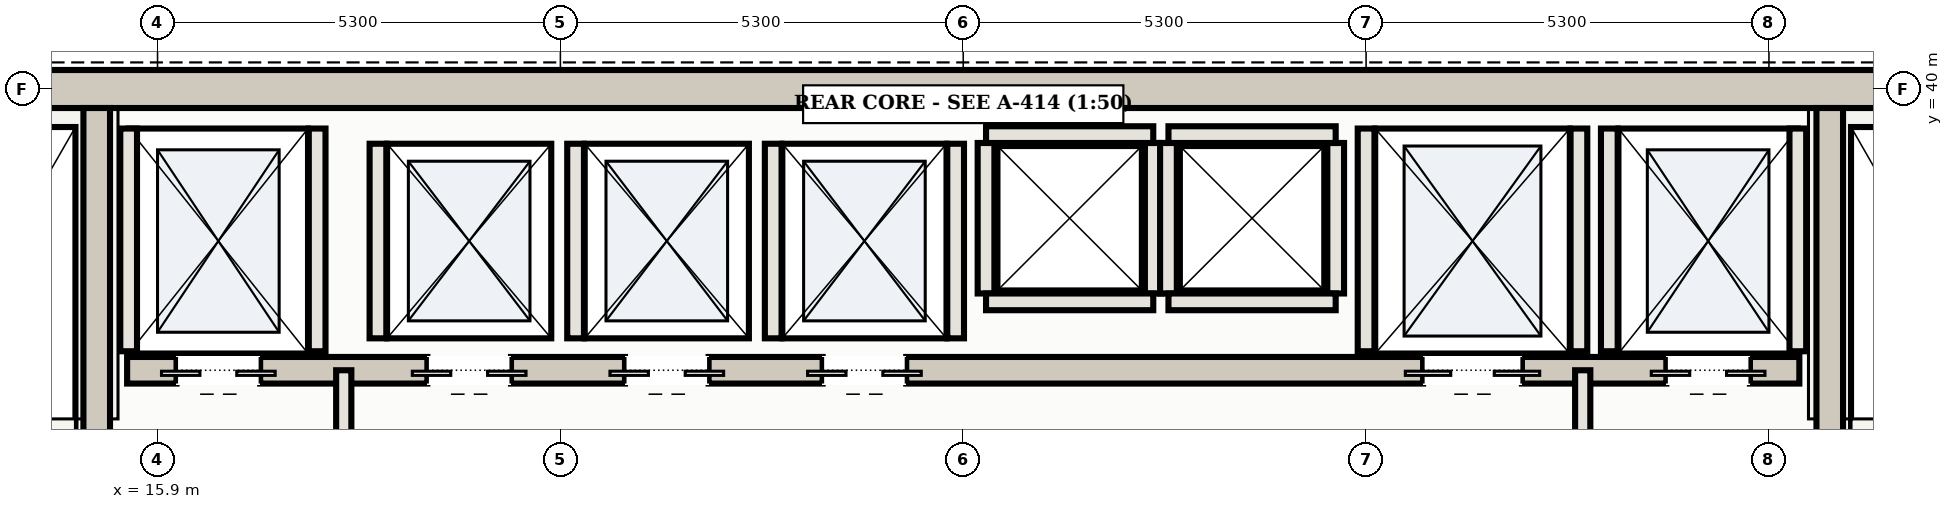
"""IFC4 building model, lengths in metres.
Left out: names, types, materials, properties, quantities, classifications, styles, units other than length and angle.
Written with IfcOpenShell. Run it as: python <this file> out.ifc"""

import sys

from ifc_helpers import new_model, si_unit, direction, frame, frame_2d, origin, place, context, subcontext, project, spatial, rectangle, extrude, element, fill, save


model = new_model("IFC4")
c1 = context("Model", 3, precision=1e-05, world=origin(), true_north=direction((0.0, 1.0)))
c2 = subcontext(c1, "Body", "Model", "MODEL_VIEW")
j1 = project(units=[si_unit("LENGTHUNIT", "METRE"), si_unit("PLANEANGLEUNIT", "RADIAN")], contexts=[c1])
p1 = place(None, origin())
s1 = spatial("IfcSite", under=j1, at=p1, CompositionType="ELEMENT")
p2 = place(p1, origin())
s2 = spatial("IfcBuilding", under=s1, at=p2, CompositionType="ELEMENT")
p3 = place(p2, frame((0.0, 0.0, 249.5)))
s3 = spatial("IfcBuildingStorey", under=s2, at=p3, CompositionType="ELEMENT", Elevation=249.5)
p4 = place(p3, frame((10.35, 40.0, 0.0), z_axis=(0.0, 0.0, 1.0), x_axis=(1.0, 0.0, 0.0)))
e1 = element("IfcWall", 1, at=p4, inside=s3, PredefinedType="SHEAR", context=c2, shape_type="SweptSolid", body=[
    extrude(rectangle(XDim=32.3, YDim=0.5, at=frame_2d((16.15, 0.0))), origin(), (0.0, 0.0, 1.0), 3.11),
])
p5 = place(p3, frame((15.1, 31.1, 0.0), z_axis=(0.0, 0.0, 1.0), x_axis=(0.0, 1.0, 0.0)))
e2 = element("IfcWall", 2, at=p5, inside=s3, PredefinedType="SHEAR", context=c2, shape_type="SweptSolid", body=[
    extrude(rectangle(XDim=8.65, YDim=0.35, at=frame_2d((4.325, 0.0))), origin(), (0.0, 0.0, 1.0), 3.11),
])
p6 = place(p5, frame((0.51, 0.0, 0.0)))
e3 = element("IfcOpeningElement", 3, at=p6, cuts=e2, PredefinedType="OPENING", context=c2, shape_type="SweptSolid", body=[
    extrude(rectangle(XDim=1.15, YDim=2.2, at=frame_2d((0.575, 1.1))), frame((0.0, 0.185, 0.0), z_axis=(0.0, -1.0, 0.0), x_axis=(1.0, 0.0, 0.0)), (0.0, 0.0, 1.0), 0.37),
])
p7 = place(p3, frame((37.9, 31.1, 0.0), z_axis=(0.0, 0.0, 1.0), x_axis=(0.0, 1.0, 0.0)))
e4 = element("IfcWall", 4, at=p7, inside=s3, PredefinedType="SHEAR", context=c2, shape_type="SweptSolid", body=[
    extrude(rectangle(XDim=8.65, YDim=0.35, at=frame_2d((4.325, 0.0))), origin(), (0.0, 0.0, 1.0), 3.11),
])
p8 = place(p7, frame((0.51, 0.0, 0.0)))
e5 = element("IfcOpeningElement", 5, at=p8, cuts=e4, PredefinedType="OPENING", context=c2, shape_type="SweptSolid", body=[
    extrude(rectangle(XDim=1.15, YDim=2.2, at=frame_2d((0.575, 1.1))), frame((0.0, 0.185, 0.0), z_axis=(0.0, -1.0, 0.0), x_axis=(1.0, 0.0, 0.0)), (0.0, 0.0, 1.0), 0.37),
])
p9 = place(p3, frame((15.5, 36.3, 0.0), z_axis=(0.0, 0.0, 1.0), x_axis=(1.0, 0.0, 0.0)))
e6 = element("IfcWall", 6, at=p9, inside=s3, PredefinedType="SHEAR", context=c2, shape_type="SweptSolid", body=[
    extrude(rectangle(XDim=22.0, YDim=0.35, at=frame_2d((11.0, 0.0))), origin(), (0.0, 0.0, 1.0), 3.11),
])
p10 = place(p9, frame((0.65, 0.0, 0.0)))
e7 = element("IfcOpeningElement", 7, at=p10, cuts=e6, PredefinedType="OPENING", context=c2, shape_type="SweptSolid", body=[
    extrude(rectangle(XDim=1.1, YDim=2.15, at=frame_2d((0.55, 1.075))), frame((0.0, 0.185, 0.0), z_axis=(0.0, -1.0, 0.0), x_axis=(1.0, 0.0, 0.0)), (0.0, 0.0, 1.0), 0.37),
])
p11 = place(p9, frame((20.25, 0.0, 0.0)))
e8 = element("IfcOpeningElement", 8, at=p11, cuts=e6, PredefinedType="OPENING", context=c2, shape_type="SweptSolid", body=[
    extrude(rectangle(XDim=1.1, YDim=2.15, at=frame_2d((0.55, 1.075))), frame((0.0, 0.185, 0.0), z_axis=(0.0, -1.0, 0.0), x_axis=(1.0, 0.0, 0.0)), (0.0, 0.0, 1.0), 0.37),
])
p12 = place(p9, frame((17.05, 0.0, 0.0)))
e9 = element("IfcOpeningElement", 9, at=p12, cuts=e6, PredefinedType="OPENING", context=c2, shape_type="SweptSolid", body=[
    extrude(rectangle(XDim=1.3, YDim=2.2, at=frame_2d((0.65, 1.1))), frame((0.0, 0.185, 0.0), z_axis=(0.0, -1.0, 0.0), x_axis=(1.0, 0.0, 0.0)), (0.0, 0.0, 1.0), 0.37),
])
p13 = place(p9, frame((3.95, 0.0, 0.0)))
e10 = element("IfcOpeningElement", 10, at=p13, cuts=e6, PredefinedType="OPENING", context=c2, shape_type="SweptSolid", body=[
    extrude(rectangle(XDim=1.1, YDim=2.15, at=frame_2d((0.55, 1.075))), frame((0.0, 0.185, 0.0), z_axis=(0.0, -1.0, 0.0), x_axis=(1.0, 0.0, 0.0)), (0.0, 0.0, 1.0), 0.37),
])
p14 = place(p9, frame((6.55, 0.0, 0.0)))
e11 = element("IfcOpeningElement", 11, at=p14, cuts=e6, PredefinedType="OPENING", context=c2, shape_type="SweptSolid", body=[
    extrude(rectangle(XDim=1.1, YDim=2.15, at=frame_2d((0.55, 1.075))), frame((0.0, 0.185, 0.0), z_axis=(0.0, -1.0, 0.0), x_axis=(1.0, 0.0, 0.0)), (0.0, 0.0, 1.0), 0.37),
])
p15 = place(p9, frame((9.15, 0.0, 0.0)))
e12 = element("IfcOpeningElement", 12, at=p15, cuts=e6, PredefinedType="OPENING", context=c2, shape_type="SweptSolid", body=[
    extrude(rectangle(XDim=1.1, YDim=2.15, at=frame_2d((0.55, 1.075))), frame((0.0, 0.185, 0.0), z_axis=(0.0, -1.0, 0.0), x_axis=(1.0, 0.0, 0.0)), (0.0, 0.0, 1.0), 0.37),
])
for number, where, z_axis, x_axis in (
    (13, (15.52, 36.55, 0.0), (0.0, 0.0, 1.0), (0.0, 1.0, 0.0)),
    (14, (18.0, 36.55, 0.0), (0.0, 0.0, 1.0), (0.0, 1.0, 0.0)),
    (15, (35.0, 36.55, 0.0), (0.0, 0.0, 1.0), (0.0, 1.0, 0.0)),
    (16, (37.48, 36.55, 0.0), (0.0, 0.0, 1.0), (0.0, 1.0, 0.0)),
    (17, (31.8, 36.55, 0.0), (0.0, 0.0, 1.0), (0.0, 1.0, 0.0)),
    (18, (34.6, 36.55, 0.0), (0.0, 0.0, 1.0), (0.0, 1.0, 0.0)),
):
    element("IfcWall", number, at=place(p3, frame(where, z_axis=z_axis, x_axis=x_axis)), inside=s3, PredefinedType="SOLIDWALL", context=c2, shape_type="SweptSolid", body=[
        extrude(rectangle(XDim=2.93, YDim=0.22, at=frame_2d((1.465, 0.0))), origin(), (0.0, 0.0, 1.0), 3.11),
    ])
for number, where, z_axis, x_axis in (
    (19, (18.8, 36.72, 0.0), (0.0, 0.0, 1.0), (0.0, 1.0, 0.0)),
    (20, (21.4, 36.72, 0.0), (0.0, 0.0, 1.0), (0.0, 1.0, 0.0)),
    (21, (24.0, 36.72, 0.0), (0.0, 0.0, 1.0), (0.0, 1.0, 0.0)),
    (22, (26.4, 36.72, 0.0), (0.0, 0.0, 1.0), (0.0, 1.0, 0.0)),
):
    element("IfcWall", number, at=place(p3, frame(where, z_axis=z_axis, x_axis=x_axis)), inside=s3, PredefinedType="SOLIDWALL", context=c2, shape_type="SweptSolid", body=[
        extrude(rectangle(XDim=2.56, YDim=0.22, at=frame_2d((1.28, 0.0))), origin(), (0.0, 0.0, 1.0), 3.11),
    ])
for number, where, z_axis, x_axis in (
    (23, (26.8, 37.31, 0.0), (0.0, 0.0, 1.0), (0.0, 1.0, 0.0)),
    (24, (29.0, 37.31, 0.0), (0.0, 0.0, 1.0), (0.0, 1.0, 0.0)),
):
    element("IfcWall", number, at=place(p3, frame(where, z_axis=z_axis, x_axis=x_axis)), inside=s3, PredefinedType="SOLIDWALL", context=c2, shape_type="SweptSolid", body=[
        extrude(rectangle(XDim=1.98, YDim=0.22, at=frame_2d((0.99, 0.0))), origin(), (0.0, 0.0, 1.0), 3.11),
    ])
for number, where, z_axis, x_axis in (
    (25, (26.8, 39.4, 0.0), (0.0, 0.0, 1.0), (1.0, 0.0, 0.0)),
    (26, (26.8, 37.2, 0.0), (0.0, 0.0, 1.0), (1.0, 0.0, 0.0)),
):
    element("IfcWall", number, at=place(p3, frame(where, z_axis=z_axis, x_axis=x_axis)), inside=s3, PredefinedType="SOLIDWALL", context=c2, shape_type="SweptSolid", body=[
        extrude(rectangle(XDim=2.2, YDim=0.22, at=frame_2d((1.1, 0.0))), origin(), (0.0, 0.0, 1.0), 3.11),
    ])
for number, where, z_axis, x_axis in (
    (27, (29.2, 37.31, 0.0), (0.0, 0.0, 1.0), (0.0, 1.0, 0.0)),
    (28, (31.4, 37.31, 0.0), (0.0, 0.0, 1.0), (0.0, 1.0, 0.0)),
):
    element("IfcWall", number, at=place(p3, frame(where, z_axis=z_axis, x_axis=x_axis)), inside=s3, PredefinedType="SOLIDWALL", context=c2, shape_type="SweptSolid", body=[
        extrude(rectangle(XDim=1.98, YDim=0.22, at=frame_2d((0.99, 0.0))), origin(), (0.0, 0.0, 1.0), 3.11),
    ])
for number, where, z_axis, x_axis in (
    (29, (29.2, 39.4, 0.0), (0.0, 0.0, 1.0), (1.0, 0.0, 0.0)),
    (30, (29.2, 37.2, 0.0), (0.0, 0.0, 1.0), (1.0, 0.0, 0.0)),
):
    element("IfcWall", number, at=place(p3, frame(where, z_axis=z_axis, x_axis=x_axis)), inside=s3, PredefinedType="SOLIDWALL", context=c2, shape_type="SweptSolid", body=[
        extrude(rectangle(XDim=2.2, YDim=0.22, at=frame_2d((1.1, 0.0))), origin(), (0.0, 0.0, 1.0), 3.11),
    ])
p16 = place(p3, frame((18.35, 31.15, 0.0), z_axis=(0.0, 0.0, 1.0), x_axis=(0.0, 1.0, 0.0)))
e31 = element("IfcWall", 31, at=p16, inside=s3, PredefinedType="PARTITIONING", context=c2, shape_type="SweptSolid", body=[
    extrude(rectangle(XDim=5.15, YDim=0.2, at=frame_2d((2.575, 0.0))), origin(), (0.0, 0.0, 1.0), 2.45),
])
p17 = place(p16, frame((1.875, 0.0, 0.0)))
e32 = element("IfcOpeningElement", 32, at=p17, cuts=e31, PredefinedType="OPENING", context=c2, shape_type="SweptSolid", body=[
    extrude(rectangle(XDim=1.25, YDim=2.2, at=frame_2d((0.625, 1.1))), frame((0.0, 0.11, 0.0), z_axis=(0.0, -1.0, 0.0), x_axis=(1.0, 0.0, 0.0)), (0.0, 0.0, 1.0), 0.22),
])
p18 = place(p3, frame((34.65, 31.15, 0.0), z_axis=(0.0, 0.0, 1.0), x_axis=(0.0, 1.0, 0.0)))
e33 = element("IfcWall", 33, at=p18, inside=s3, PredefinedType="PARTITIONING", context=c2, shape_type="SweptSolid", body=[
    extrude(rectangle(XDim=5.15, YDim=0.2, at=frame_2d((2.575, 0.0))), origin(), (0.0, 0.0, 1.0), 2.45),
])
p19 = place(p18, frame((1.875, 0.0, 0.0)))
e34 = element("IfcOpeningElement", 34, at=p19, cuts=e33, PredefinedType="OPENING", context=c2, shape_type="SweptSolid", body=[
    extrude(rectangle(XDim=1.25, YDim=2.2, at=frame_2d((0.625, 1.1))), frame((0.0, 0.11, 0.0), z_axis=(0.0, -1.0, 0.0), x_axis=(1.0, 0.0, 0.0)), (0.0, 0.0, 1.0), 0.22),
])
p20 = place(p10, frame((1.1, 0.0, 0.0), z_axis=(0.0, 0.0, 1.0), x_axis=(-1.0, 0.0, 0.0)))
e35 = element("IfcDoor", 35, at=p20, inside=s3, OperationType="DOUBLE_DOOR_SLIDING", PredefinedType="DOOR", context=c2, shape_type="SweptSolid", body=[
    extrude(rectangle(XDim=1.1, YDim=2.15, at=frame_2d((0.55, 1.075))), frame((0.0, 0.025, 0.0), z_axis=(0.0, -1.0, 0.0), x_axis=(1.0, 0.0, 0.0)), (0.0, 0.0, 1.0), 0.05),
])
fill(e7, e35)
p21 = place(p11, frame((1.1, 0.0, 0.0), z_axis=(0.0, 0.0, 1.0), x_axis=(-1.0, 0.0, 0.0)))
e36 = element("IfcDoor", 36, at=p21, inside=s3, OperationType="DOUBLE_DOOR_SLIDING", PredefinedType="DOOR", context=c2, shape_type="SweptSolid", body=[
    extrude(rectangle(XDim=1.1, YDim=2.15, at=frame_2d((0.55, 1.075))), frame((0.0, 0.025, 0.0), z_axis=(0.0, -1.0, 0.0), x_axis=(1.0, 0.0, 0.0)), (0.0, 0.0, 1.0), 0.05),
])
fill(e8, e36)
p22 = place(p12, frame((1.3, 0.0, 0.0), z_axis=(0.0, 0.0, 1.0), x_axis=(-1.0, 0.0, 0.0)))
e37 = element("IfcDoor", 37, at=p22, inside=s3, OperationType="DOUBLE_DOOR_SLIDING", PredefinedType="DOOR", context=c2, shape_type="SweptSolid", body=[
    extrude(rectangle(XDim=1.3, YDim=2.2, at=frame_2d((0.65, 1.1))), frame((0.0, 0.025, 0.0), z_axis=(0.0, -1.0, 0.0), x_axis=(1.0, 0.0, 0.0)), (0.0, 0.0, 1.0), 0.05),
])
fill(e9, e37)
p23 = place(p13, frame((1.1, 0.0, 0.0), z_axis=(0.0, 0.0, 1.0), x_axis=(-1.0, 0.0, 0.0)))
e38 = element("IfcDoor", 38, at=p23, inside=s3, OperationType="DOUBLE_DOOR_SLIDING", PredefinedType="DOOR", context=c2, shape_type="SweptSolid", body=[
    extrude(rectangle(XDim=1.1, YDim=2.15, at=frame_2d((0.55, 1.075))), frame((0.0, 0.025, 0.0), z_axis=(0.0, -1.0, 0.0), x_axis=(1.0, 0.0, 0.0)), (0.0, 0.0, 1.0), 0.05),
])
fill(e10, e38)
p24 = place(p14, frame((1.1, 0.0, 0.0), z_axis=(0.0, 0.0, 1.0), x_axis=(-1.0, 0.0, 0.0)))
e39 = element("IfcDoor", 39, at=p24, inside=s3, OperationType="DOUBLE_DOOR_SLIDING", PredefinedType="DOOR", context=c2, shape_type="SweptSolid", body=[
    extrude(rectangle(XDim=1.1, YDim=2.15, at=frame_2d((0.55, 1.075))), frame((0.0, 0.025, 0.0), z_axis=(0.0, -1.0, 0.0), x_axis=(1.0, 0.0, 0.0)), (0.0, 0.0, 1.0), 0.05),
])
fill(e11, e39)
p25 = place(p15, frame((1.1, 0.0, 0.0), z_axis=(0.0, 0.0, 1.0), x_axis=(-1.0, 0.0, 0.0)))
e40 = element("IfcDoor", 40, at=p25, inside=s3, OperationType="DOUBLE_DOOR_SLIDING", PredefinedType="DOOR", context=c2, shape_type="SweptSolid", body=[
    extrude(rectangle(XDim=1.1, YDim=2.15, at=frame_2d((0.55, 1.075))), frame((0.0, 0.025, 0.0), z_axis=(0.0, -1.0, 0.0), x_axis=(1.0, 0.0, 0.0)), (0.0, 0.0, 1.0), 0.05),
])
fill(e12, e40)
save(model, sys.argv[1])
